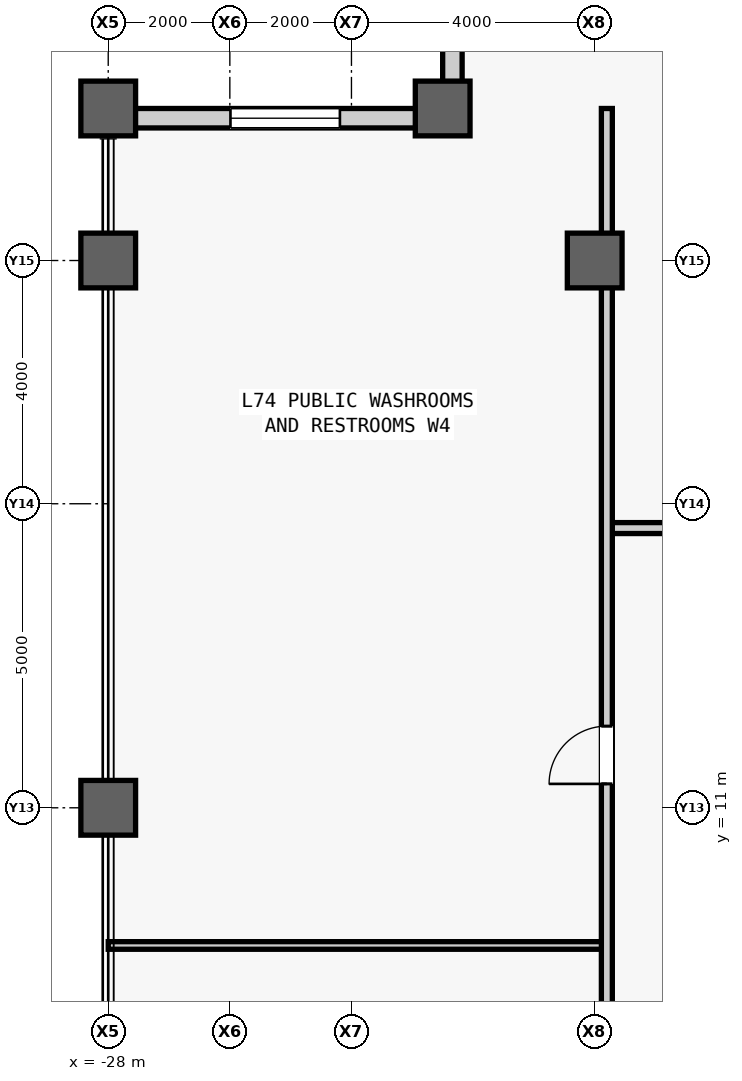
"""IFC4 building model, lengths in metres.
Left out: names, types, materials, properties, quantities, classifications, styles, units other than length and angle.
Written with IfcOpenShell. Run it as: python <this file> out.ifc"""

import sys

from ifc_helpers import new_model, si_unit, direction, frame, frame_2d, origin, origin_2d, place, context, subcontext, project, spatial, rectangle, hollow_rectangle, extrude, source, transform, mapped, element, fill, save


model = new_model("IFC4")
c1 = context("Model", 3, precision=1e-05, world=origin(), true_north=direction((0.0, 1.0)))
c2 = subcontext(c1, "Body", "Model", "MODEL_VIEW")
j1 = project(units=[si_unit("LENGTHUNIT", "METRE"), si_unit("PLANEANGLEUNIT", "RADIAN")], contexts=[c1])
p1 = place(None, origin())
s1 = spatial("IfcSite", under=j1, at=p1, CompositionType="ELEMENT")
p2 = place(p1, origin())
s2 = spatial("IfcBuilding", under=s1, at=p2, CompositionType="ELEMENT")
p3 = place(p2, frame((0.0, 0.0, 313.5)))
s3 = spatial("IfcBuildingStorey", under=s2, at=p3, CompositionType="ELEMENT", Elevation=313.5)
m1 = source(origin(), c2, "Body", "SweptSolid", [
    extrude(hollow_rectangle(XDim=0.9, YDim=0.9, WallThickness=0.05, at=origin_2d()), origin(), (0.0, 0.0, 1.0), 4.0),
])
for number, where, z_axis, x_axis in (
    (1, (-28.0, 11.0, 0.0), (0.0, 0.0, 1.0), (1.0, 0.0, 0.0)),
    (2, (-28.0, 20.0, 0.0), (0.0, 0.0, 1.0), (1.0, 0.0, 0.0)),
    (3, (-28.0, 22.5, 0.0), (0.0, 0.0, 1.0), (1.0, 0.0, 0.0)),
    (4, (-22.5, 22.5, 0.0), (0.0, 0.0, 1.0), (1.0, 0.0, 0.0)),
    (5, (-20.0, 20.0, 0.0), (0.0, 0.0, 1.0), (1.0, 0.0, 0.0)),
):
    element("IfcColumn", number, at=place(p3, frame(where, z_axis=z_axis, x_axis=x_axis)), inside=s3, PredefinedType="COLUMN", context=c2, shape_type="MappedRepresentation", body=[
        mapped(m1, transform((0.0, 0.0, 0.0), scale=1.0)),
    ])
m2 = source(origin(), c2, "Body", "SweptSolid", [
    extrude(rectangle(XDim=5.18, YDim=0.32, at=frame_2d((2.59, 0.0))), origin(), (0.0, 0.0, 1.0), 3.231),
])
p4 = place(p3, frame((-22.34, 22.5, 0.0), z_axis=(0.0, 0.0, 1.0), x_axis=(0.0, 1.0, 0.0)))
e6 = element("IfcWall", 6, at=p4, inside=s3, PredefinedType="STANDARD", context=c2, shape_type="MappedRepresentation", body=[
    mapped(m2, transform((0.0, 0.0, 0.0), scale=1.0)),
])
m3 = source(origin(), c2, "Body", "SweptSolid", [
    extrude(rectangle(XDim=1.8, YDim=2.4, at=frame_2d((0.9, 1.2))), frame((0.0, 0.17, 0.0), z_axis=(0.0, -1.0, 0.0), x_axis=(1.0, 0.0, 0.0)), (0.0, 0.0, 1.0), 0.34),
])
p5 = place(p4, frame((1.69, 0.0, 0.5)))
e7 = element("IfcOpeningElement", 7, at=p5, cuts=e6, PredefinedType="OPENING", context=c2, shape_type="MappedRepresentation", body=[
    mapped(m3, transform((0.0, 0.0, 0.0), scale=1.0)),
])
p6 = place(p3, frame((-22.5, 22.34, 0.0), z_axis=(0.0, 0.0, 1.0), x_axis=(-1.0, 0.0, 0.0)))
e8 = element("IfcWall", 8, at=p6, inside=s3, PredefinedType="STANDARD", context=c2, shape_type="MappedRepresentation", body=[
    mapped(m2, transform((0.0, 0.0, 0.0), scale=1.0)),
])
p7 = place(p6, frame((1.69, 0.0, 0.5)))
e9 = element("IfcOpeningElement", 9, at=p7, cuts=e8, PredefinedType="OPENING", context=c2, shape_type="MappedRepresentation", body=[
    mapped(m3, transform((0.0, 0.0, 0.0), scale=1.0)),
])
m4 = source(origin(), c2, "Body", "SweptSolid", [
    extrude(rectangle(XDim=2.4, YDim=0.18, at=frame_2d((1.2, 0.0))), origin(), (0.0, 0.0, 1.0), 3.78),
])
p8 = place(p3, frame((-19.8, 15.6, 0.0), z_axis=(0.0, 0.0, 1.0), x_axis=(1.0, 0.0, 0.0)))
e10 = element("IfcWall", 10, at=p8, inside=s3, PredefinedType="PARTITIONING", context=c2, shape_type="MappedRepresentation", body=[
    mapped(m4, transform((0.0, 0.0, 0.0), scale=1.0)),
])
m5 = source(origin(), c2, "Body", "SweptSolid", [
    extrude(rectangle(XDim=8.2, YDim=0.125, at=frame_2d((4.1, 0.0))), origin(), (0.0, 0.0, 1.0), 3.78),
])
p9 = place(p3, frame((-28.0, 8.736, 0.0), z_axis=(0.0, 0.0, 1.0), x_axis=(1.0, 0.0, 0.0)))
e11 = element("IfcWall", 11, at=p9, inside=s3, PredefinedType="PARTITIONING", context=c2, shape_type="MappedRepresentation", body=[
    mapped(m5, transform((0.0, 0.0, 0.0), scale=1.0)),
])
m6 = source(origin(), c2, "Body", "SweptSolid", [
    extrude(rectangle(XDim=40.5, YDim=0.18, at=frame_2d((20.25, 0.0))), origin(), (0.0, 0.0, 1.0), 3.164),
])
p10 = place(p3, frame((-19.8, -18.0, 0.0), z_axis=(0.0, 0.0, 1.0), x_axis=(0.0, 1.0, 0.0)))
e12 = element("IfcWall", 12, at=p10, inside=s3, PredefinedType="PARTITIONING", context=c2, shape_type="MappedRepresentation", body=[
    mapped(m6, transform((0.0, 0.0, 0.0), scale=1.0)),
])
m7 = source(origin(), c2, "Body", "SweptSolid", [
    extrude(rectangle(XDim=0.95, YDim=2.15, at=frame_2d((0.475, 1.075))), frame((0.0, 0.1, 0.0), z_axis=(0.0, -1.0, 0.0), x_axis=(1.0, 0.0, 0.0)), (0.0, 0.0, 1.0), 0.2),
])
p11 = place(p10, frame((5.657, 0.0, 0.0)))
e13 = element("IfcOpeningElement", 13, at=p11, cuts=e12, PredefinedType="OPENING", context=c2, shape_type="MappedRepresentation", body=[
    mapped(m7, transform((0.0, 0.0, 0.0), scale=1.0)),
])
p12 = place(p10, frame((13.157, 0.0, 0.0)))
e14 = element("IfcOpeningElement", 14, at=p12, cuts=e12, PredefinedType="OPENING", context=c2, shape_type="MappedRepresentation", body=[
    mapped(m7, transform((0.0, 0.0, 0.0), scale=1.0)),
])
p13 = place(p10, frame((21.893, 0.0, 0.0)))
e15 = element("IfcOpeningElement", 15, at=p13, cuts=e12, PredefinedType="OPENING", context=c2, shape_type="MappedRepresentation", body=[
    mapped(m7, transform((0.0, 0.0, 0.0), scale=1.0)),
])
p14 = place(p10, frame((29.393, 0.0, 0.0)))
e16 = element("IfcOpeningElement", 16, at=p14, cuts=e12, PredefinedType="OPENING", context=c2, shape_type="MappedRepresentation", body=[
    mapped(m7, transform((0.0, 0.0, 0.0), scale=1.0)),
])
m8 = source(origin(), c2, "Body", "SweptSolid", [
    extrude(rectangle(XDim=1.8, YDim=2.4, at=frame_2d((0.9, 1.2))), frame((0.0, 0.03, 0.0), z_axis=(0.0, -1.0, 0.0), x_axis=(1.0, 0.0, 0.0)), (0.0, 0.0, 1.0), 0.06),
])
p15 = place(p7, origin())
e17 = element("IfcWindow", 17, at=p15, inside=s3, PartitioningType="SINGLE_PANEL", PredefinedType="WINDOW", context=c2, shape_type="MappedRepresentation", body=[
    mapped(m8, transform((0.0, 0.0, 0.0), scale=1.0)),
])
fill(e9, e17)
m9 = source(origin(), c2, "Body", "SweptSolid", [
    extrude(rectangle(XDim=0.95, YDim=2.15, at=frame_2d((0.475, 1.075))), frame((0.0, 0.025, 0.0), z_axis=(0.0, -1.0, 0.0), x_axis=(1.0, 0.0, 0.0)), (0.0, 0.0, 1.0), 0.05),
])
p16 = place(p14, origin())
e18 = element("IfcDoor", 18, at=p16, inside=s3, OperationType="SINGLE_SWING_LEFT", PredefinedType="DOOR", context=c2, shape_type="MappedRepresentation", body=[
    mapped(m9, transform((0.0, 0.0, 0.0), scale=1.0)),
])
fill(e16, e18)
save(model, sys.argv[1])
